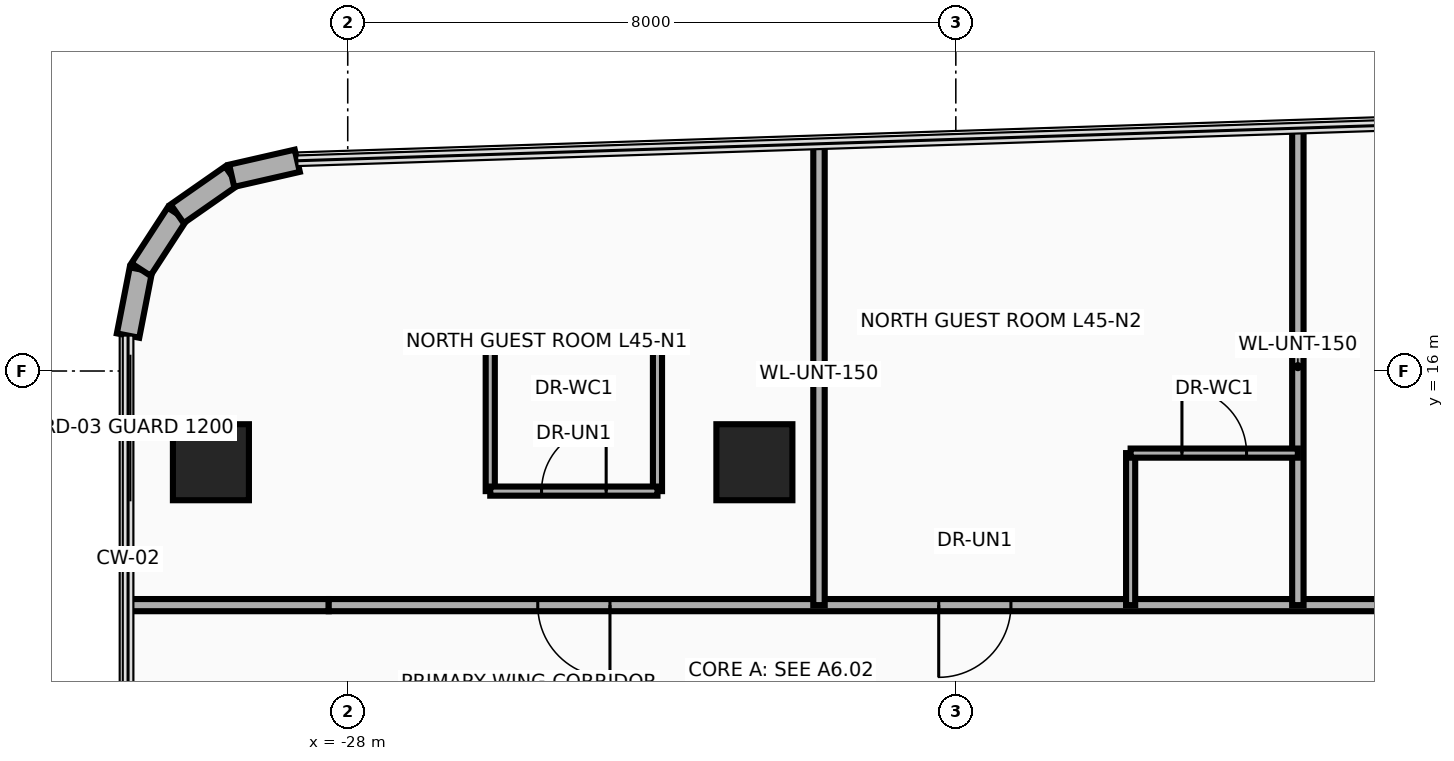
"""IFC4 building model, lengths in metres.
Left out: names, types, materials, properties, quantities, classifications, styles, units other than length and angle.
Written with IfcOpenShell. Run it as: python <this file> out.ifc"""

import sys

from ifc_helpers import new_model, si_unit, direction, frame, frame_2d, origin, origin_2d, place, context, subcontext, project, spatial, rectangle, extrude, source, transform, mapped, element, fill, save


model = new_model("IFC4")
c1 = context("Model", 3, precision=1e-05, world=origin(), true_north=direction((0.0, 1.0)))
c2 = subcontext(c1, "Body", "Model", "MODEL_VIEW")
j1 = project(units=[si_unit("LENGTHUNIT", "METRE"), si_unit("PLANEANGLEUNIT", "RADIAN")], contexts=[c1])
p1 = place(None, origin())
s1 = spatial("IfcSite", under=j1, at=p1, CompositionType="ELEMENT")
p2 = place(p1, origin())
s2 = spatial("IfcBuilding", under=s1, at=p2, CompositionType="ELEMENT")
p3 = place(p2, frame((0.0, 0.0, 176.55)))
s3 = spatial("IfcBuildingStorey", under=s2, at=p3, CompositionType="ELEMENT", Elevation=176.55)
m1 = source(origin(), c2, "Body", "SweptSolid", [
    extrude(rectangle(XDim=1.0, YDim=1.0, at=origin_2d()), origin(), (0.0, 0.0, 1.0), 3.95),
])
for number, where, z_axis, x_axis in (
    (1, (-29.8, 14.8, 0.0), (0.0, 0.0, 1.0), (1.0, 0.0, 0.0)),
    (2, (-22.65, 14.8, 0.0), (0.0, 0.0, 1.0), (1.0, 0.0, 0.0)),
):
    element("IfcColumn", number, at=place(p3, frame(where, z_axis=z_axis, x_axis=x_axis)), inside=s3, PredefinedType="COLUMN", context=c2, shape_type="MappedRepresentation", body=[
        mapped(m1, transform((0.0, 0.0, 0.0), x_axis=(1.0, 0.0, 0.0), y_axis=(0.0, 1.0, 0.0), z_axis=(0.0, 0.0, 1.0), scale=1.0)),
    ])
p4 = place(p3, frame((-30.89, 16.466, 0.0), z_axis=(0.0, 0.0, 1.0), x_axis=(0.191128020887, 0.981565117367, 0.0)))
e3 = element("IfcWall", 3, at=p4, inside=s3, PredefinedType="SOLIDWALL", context=c2, shape_type="SweptSolid", body=[
    extrude(rectangle(XDim=0.885, YDim=0.3, at=frame_2d((0.443, 0.0))), origin(), (0.0, 0.0, 1.0), 3.63),
])
p5 = place(p3, frame((-30.721, 17.335, 0.0), z_axis=(0.0, 0.0, 1.0), x_axis=(0.545322000684, 0.838226649284, 0.0)))
e4 = element("IfcWall", 4, at=p5, inside=s3, PredefinedType="SOLIDWALL", context=c2, shape_type="SweptSolid", body=[
    extrude(rectangle(XDim=0.874, YDim=0.3, at=frame_2d((0.437, 0.0))), origin(), (0.0, 0.0, 1.0), 3.63),
])
p6 = place(p3, frame((-30.244, 18.068, 0.0), z_axis=(0.0, 0.0, 1.0), x_axis=(0.820005059444, 0.572356272339, 0.0)))
e5 = element("IfcWall", 5, at=p6, inside=s3, PredefinedType="SOLIDWALL", context=c2, shape_type="SweptSolid", body=[
    extrude(rectangle(XDim=0.875, YDim=0.3, at=frame_2d((0.437, 0.0))), origin(), (0.0, 0.0, 1.0), 3.63),
])
p7 = place(p3, frame((-29.527, 18.569, 0.0), z_axis=(0.0, 0.0, 1.0), x_axis=(0.974798570829, 0.223086858218, 0.0)))
e6 = element("IfcWall", 6, at=p7, inside=s3, PredefinedType="SOLIDWALL", context=c2, shape_type="SweptSolid", body=[
    extrude(rectangle(XDim=0.885, YDim=0.3, at=frame_2d((0.443, 0.0))), origin(), (0.0, 0.0, 1.0), 3.63),
])
p8 = place(p3, frame((-30.89, 12.92, 0.0), z_axis=(0.0, 0.0, 1.0), x_axis=(1.0, 0.0, 0.0)))
e7 = element("IfcWall", 7, at=p8, inside=s3, PredefinedType="PARTITIONING", context=c2, shape_type="SweptSolid", body=[
    extrude(rectangle(XDim=2.64, YDim=0.16, at=frame_2d((1.32, 0.0))), origin(), (0.0, 0.0, 1.0), 3.076),
])
p9 = place(p3, frame((-28.25, 12.92, 0.0), z_axis=(0.0, 0.0, 1.0), x_axis=(1.0, 0.0, 0.0)))
e8 = element("IfcWall", 8, at=p9, inside=s3, PredefinedType="PARTITIONING", context=c2, shape_type="SweptSolid", body=[
    extrude(rectangle(XDim=36.75, YDim=0.16, at=frame_2d((18.375, 0.0))), origin(), (0.0, 0.0, 1.0), 2.615),
])
p10 = place(p9, frame((2.75, 0.0, 0.0)))
e9 = element("IfcOpeningElement", 9, at=p10, cuts=e8, PredefinedType="OPENING", context=c2, shape_type="SweptSolid", body=[
    extrude(rectangle(XDim=0.95, YDim=2.15, at=frame_2d((0.475, 1.075))), frame((0.0, 0.095, 0.0), z_axis=(0.0, -1.0, 0.0), x_axis=(1.0, 0.0, 0.0)), (0.0, 0.0, 1.0), 0.19),
])
p11 = place(p9, frame((8.025, 0.0, 0.0)))
e10 = element("IfcOpeningElement", 10, at=p11, cuts=e8, PredefinedType="OPENING", context=c2, shape_type="SweptSolid", body=[
    extrude(rectangle(XDim=0.95, YDim=2.15, at=frame_2d((0.475, 1.075))), frame((0.0, 0.095, 0.0), z_axis=(0.0, -1.0, 0.0), x_axis=(1.0, 0.0, 0.0)), (0.0, 0.0, 1.0), 0.19),
])
p12 = place(p9, frame((15.175, 0.0, 0.0)))
e11 = element("IfcOpeningElement", 11, at=p12, cuts=e8, PredefinedType="OPENING", context=c2, shape_type="SweptSolid", body=[
    extrude(rectangle(XDim=0.95, YDim=2.15, at=frame_2d((0.475, 1.075))), frame((0.0, 0.095, 0.0), z_axis=(0.0, -1.0, 0.0), x_axis=(1.0, 0.0, 0.0)), (0.0, 0.0, 1.0), 0.19),
])
p13 = place(p9, frame((25.375, 0.0, 0.0)))
e12 = element("IfcOpeningElement", 12, at=p13, cuts=e8, PredefinedType="OPENING", context=c2, shape_type="SweptSolid", body=[
    extrude(rectangle(XDim=0.95, YDim=2.15, at=frame_2d((0.475, 1.075))), frame((0.0, 0.095, 0.0), z_axis=(0.0, -1.0, 0.0), x_axis=(1.0, 0.0, 0.0)), (0.0, 0.0, 1.0), 0.19),
])
p14 = place(p9, frame((32.275, 0.0, 0.0)))
e13 = element("IfcOpeningElement", 13, at=p14, cuts=e8, PredefinedType="OPENING", context=c2, shape_type="SweptSolid", body=[
    extrude(rectangle(XDim=0.95, YDim=2.15, at=frame_2d((0.475, 1.075))), frame((0.0, 0.095, 0.0), z_axis=(0.0, -1.0, 0.0), x_axis=(1.0, 0.0, 0.0)), (0.0, 0.0, 1.0), 0.19),
])
p15 = place(p3, frame((-21.8, 12.92, 0.0), z_axis=(0.0, 0.0, 1.0), x_axis=(0.0, 1.0, 0.0)))
e14 = element("IfcWall", 14, at=p15, inside=s3, PredefinedType="PARTITIONING", context=c2, shape_type="SweptSolid", body=[
    extrude(rectangle(XDim=6.07, YDim=0.15, at=frame_2d((3.035, 0.0))), origin(), (0.0, 0.0, 1.0), 2.665),
])
p16 = place(p3, frame((-15.5, 12.92, 0.0), z_axis=(0.0, 0.0, 1.0), x_axis=(0.0, 1.0, 0.0)))
e15 = element("IfcWall", 15, at=p16, inside=s3, PredefinedType="PARTITIONING", context=c2, shape_type="SweptSolid", body=[
    extrude(rectangle(XDim=6.275, YDim=0.15, at=frame_2d((3.137, 0.0))), origin(), (0.0, 0.0, 1.0), 2.665),
])
for number, where, z_axis, x_axis in (
    (16, (-26.125, 14.42, 0.0), (0.0, 0.0, 1.0), (0.0, 1.0, 0.0)),
    (17, (-23.925, 14.42, 0.0), (0.0, 0.0, 1.0), (0.0, 1.0, 0.0)),
):
    element("IfcWall", number, at=place(p3, frame(where, z_axis=z_axis, x_axis=x_axis)), inside=s3, PredefinedType="PARTITIONING", context=c2, shape_type="SweptSolid", body=[
        extrude(rectangle(XDim=2.0, YDim=0.12, at=frame_2d((1.0, 0.0))), origin(), (0.0, 0.0, 1.0), 2.665),
    ])
p17 = place(p3, frame((-26.125, 16.42, 0.0), z_axis=(0.0, 0.0, 1.0), x_axis=(1.0, 0.0, 0.0)))
e18 = element("IfcWall", 18, at=p17, inside=s3, PredefinedType="PARTITIONING", context=c2, shape_type="SweptSolid", body=[
    extrude(rectangle(XDim=2.2, YDim=0.12, at=frame_2d((1.1, 0.0))), origin(), (0.0, 0.0, 1.0), 3.63),
])
p18 = place(p3, frame((-26.125, 14.42, 0.0), z_axis=(0.0, 0.0, 1.0), x_axis=(1.0, 0.0, 0.0)))
e19 = element("IfcWall", 19, at=p18, inside=s3, PredefinedType="PARTITIONING", context=c2, shape_type="SweptSolid", body=[
    extrude(rectangle(XDim=2.2, YDim=0.12, at=frame_2d((1.1, 0.0))), origin(), (0.0, 0.0, 1.0), 3.63),
])
p19 = place(p18, frame((0.675, 0.0, 0.0)))
e20 = element("IfcOpeningElement", 20, at=p19, cuts=e19, PredefinedType="OPENING", context=c2, shape_type="SweptSolid", body=[
    extrude(rectangle(XDim=0.85, YDim=2.1, at=frame_2d((0.425, 1.05))), frame((0.0, 0.075, 0.0), z_axis=(0.0, -1.0, 0.0), x_axis=(1.0, 0.0, 0.0)), (0.0, 0.0, 1.0), 0.15),
])
p20 = place(p3, frame((-17.7, 12.92, 0.0), z_axis=(0.0, 0.0, 1.0), x_axis=(0.0, 1.0, 0.0)))
e21 = element("IfcWall", 21, at=p20, inside=s3, PredefinedType="PARTITIONING", context=c2, shape_type="SweptSolid", body=[
    extrude(rectangle(XDim=2.0, YDim=0.12, at=frame_2d((1.0, 0.0))), origin(), (0.0, 0.0, 1.0), 2.665),
])
p21 = place(p3, frame((-17.7, 14.92, 0.0), z_axis=(0.0, 0.0, 1.0), x_axis=(1.0, 0.0, 0.0)))
e22 = element("IfcWall", 22, at=p21, inside=s3, PredefinedType="PARTITIONING", context=c2, shape_type="SweptSolid", body=[
    extrude(rectangle(XDim=2.2, YDim=0.12, at=frame_2d((1.1, 0.0))), origin(), (0.0, 0.0, 1.0), 2.665),
])
p22 = place(p21, frame((0.675, 0.0, 0.0)))
e23 = element("IfcOpeningElement", 23, at=p22, cuts=e22, PredefinedType="OPENING", context=c2, shape_type="SweptSolid", body=[
    extrude(rectangle(XDim=0.85, YDim=2.1, at=frame_2d((0.425, 1.05))), frame((0.0, 0.075, 0.0), z_axis=(0.0, -1.0, 0.0), x_axis=(1.0, 0.0, 0.0)), (0.0, 0.0, 1.0), 0.15),
])
p23 = place(p10, frame((0.95, 0.0, 0.0), z_axis=(0.0, 0.0, 1.0), x_axis=(-1.0, 0.0, 0.0)))
e24 = element("IfcDoor", 24, at=p23, inside=s3, OperationType="SINGLE_SWING_LEFT", PredefinedType="DOOR", context=c2, shape_type="SweptSolid", body=[
    extrude(rectangle(XDim=0.95, YDim=2.15, at=frame_2d((0.475, 1.075))), frame((0.0, 0.025, 0.0), z_axis=(0.0, -1.0, 0.0), x_axis=(1.0, 0.0, 0.0)), (0.0, 0.0, 1.0), 0.05),
])
fill(e9, e24)
p24 = place(p19, origin())
e25 = element("IfcDoor", 25, at=p24, inside=s3, OperationType="SINGLE_SWING_RIGHT", PredefinedType="DOOR", context=c2, shape_type="SweptSolid", body=[
    extrude(rectangle(XDim=0.85, YDim=2.1, at=frame_2d((0.425, 1.05))), frame((0.0, 0.025, 0.0), z_axis=(0.0, -1.0, 0.0), x_axis=(1.0, 0.0, 0.0)), (0.0, 0.0, 1.0), 0.05),
])
fill(e20, e25)
p25 = place(p11, frame((0.95, 0.0, 0.0), z_axis=(0.0, 0.0, 1.0), x_axis=(-1.0, 0.0, 0.0)))
e26 = element("IfcDoor", 26, at=p25, inside=s3, OperationType="SINGLE_SWING_LEFT", PredefinedType="DOOR", context=c2, shape_type="SweptSolid", body=[
    extrude(rectangle(XDim=0.95, YDim=2.15, at=frame_2d((0.475, 1.075))), frame((0.0, 0.025, 0.0), z_axis=(0.0, -1.0, 0.0), x_axis=(1.0, 0.0, 0.0)), (0.0, 0.0, 1.0), 0.05),
])
fill(e10, e26)
p26 = place(p22, origin())
e27 = element("IfcDoor", 27, at=p26, inside=s3, OperationType="SINGLE_SWING_RIGHT", PredefinedType="DOOR", context=c2, shape_type="SweptSolid", body=[
    extrude(rectangle(XDim=0.85, YDim=2.1, at=frame_2d((0.425, 1.05))), frame((0.0, 0.025, 0.0), z_axis=(0.0, -1.0, 0.0), x_axis=(1.0, 0.0, 0.0)), (0.0, 0.0, 1.0), 0.05),
])
fill(e23, e27)
save(model, sys.argv[1])
